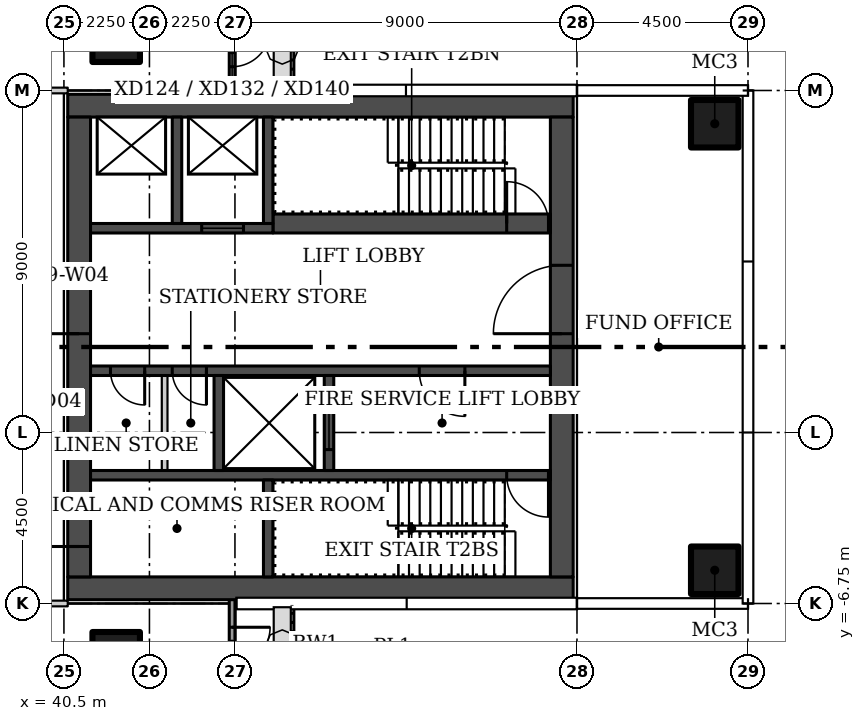
"""IFC4 building model, lengths in metres.
Left out: names, types, materials, properties, quantities, classifications, styles, units other than length and angle.
Written with IfcOpenShell. Run it as: python <this file> out.ifc"""

import sys

from ifc_helpers import new_model, si_unit, direction, frame, frame_2d, origin, origin_2d, place, context, subcontext, project, spatial, rectangle, hollow_rectangle, extrude, element, fill, save


model = new_model("IFC4")
c1 = context("Model", 3, precision=1e-05, world=origin(), true_north=direction((0.0, 1.0)))
c2 = subcontext(c1, "Body", "Model", "MODEL_VIEW")
j1 = project(units=[si_unit("LENGTHUNIT", "METRE"), si_unit("PLANEANGLEUNIT", "RADIAN")], contexts=[c1])
p1 = place(None, origin())
s1 = spatial("IfcSite", under=j1, at=p1, CompositionType="ELEMENT")
p2 = place(p1, origin())
s2 = spatial("IfcBuilding", under=s1, at=p2, CompositionType="ELEMENT")
p3 = place(p2, frame((0.0, 0.0, 89.7)))
s3 = spatial("IfcBuildingStorey", under=s2, at=p3, CompositionType="ELEMENT", Elevation=89.7)
for number, where in (
    (1, (41.875, 8.125, 0.0)),
    (2, (41.875, -8.125, 0.0)),
    (3, (57.625, -5.875, 0.0)),
    (4, (57.625, 5.875, 0.0)),
):
    element("IfcColumn", number, at=place(p3, frame(where)), inside=s3, PredefinedType="COLUMN", context=c2, shape_type="SweptSolid", body=[
        extrude(hollow_rectangle(XDim=1.25, YDim=1.25, WallThickness=0.05, at=origin_2d()), origin(), (0.0, 0.0, 1.0), 3.55),
    ])
p4 = place(p3, frame((26.9, 6.75, 0.0)))
e5 = element("IfcWall", 5, at=p4, inside=s3, PredefinedType="PARTITIONING", context=c2, shape_type="SweptSolid", body=[
    extrude(rectangle(XDim=13.7, YDim=0.15, at=frame_2d((6.85, 0.0))), origin(), (0.0, 0.0, 1.0), 3.55),
])
p5 = place(p4, frame((10.85, 0.0, 0.0)))
e6 = element("IfcOpeningElement", 6, at=p5, cuts=e5, PredefinedType="OPENING", context=c2, shape_type="SweptSolid", body=[
    extrude(rectangle(XDim=1.0, YDim=2.4, at=frame_2d((0.5, 1.2))), frame((0.0, 0.085, 0.0), z_axis=(0.0, -1.0, 0.0), x_axis=(1.0, 0.0, 0.0)), (0.0, 0.0, 1.0), 0.17),
])
p6 = place(p4, frame((3.85, 0.0, 0.0)))
e7 = element("IfcOpeningElement", 7, at=p6, cuts=e5, PredefinedType="OPENING", context=c2, shape_type="SweptSolid", body=[
    extrude(rectangle(XDim=1.5, YDim=2.1, at=frame_2d((0.75, 1.05))), frame((0.0, 0.085, 0.0), z_axis=(0.0, -1.0, 0.0), x_axis=(1.0, 0.0, 0.0)), (0.0, 0.0, 1.0), 0.17),
])
p7 = place(p3, frame((40.6, -6.75, 0.0), z_axis=(0.0, 0.0, 1.0), x_axis=(-1.0, 0.0, 0.0)))
e8 = element("IfcWall", 8, at=p7, inside=s3, PredefinedType="PARTITIONING", context=c2, shape_type="SweptSolid", body=[
    extrude(rectangle(XDim=13.7, YDim=0.15, at=frame_2d((6.85, 0.0))), origin(), (0.0, 0.0, 1.0), 3.55),
])
p8 = place(p7, frame((8.35, 0.0, 0.0)))
e9 = element("IfcOpeningElement", 9, at=p8, cuts=e8, PredefinedType="OPENING", context=c2, shape_type="SweptSolid", body=[
    extrude(rectangle(XDim=1.5, YDim=2.1, at=frame_2d((0.75, 1.05))), frame((0.0, 0.085, 0.0), z_axis=(0.0, -1.0, 0.0), x_axis=(1.0, 0.0, 0.0)), (0.0, 0.0, 1.0), 0.17),
])
p9 = place(p7, frame((1.6, 0.0, 0.0)))
e10 = element("IfcOpeningElement", 10, at=p9, cuts=e8, PredefinedType="OPENING", context=c2, shape_type="SweptSolid", body=[
    extrude(rectangle(XDim=1.5, YDim=2.1, at=frame_2d((0.75, 1.05))), frame((0.0, 0.085, 0.0), z_axis=(0.0, -1.0, 0.0), x_axis=(1.0, 0.0, 0.0)), (0.0, 0.0, 1.0), 0.17),
])
p10 = place(p3, frame((44.925, 9.0, 0.0), z_axis=(0.0, 0.0, 1.0), x_axis=(0.0, -1.0, 0.0)))
e11 = element("IfcWall", 11, at=p10, inside=s3, PredefinedType="SOLIDWALL", context=c2, shape_type="SweptSolid", body=[
    extrude(rectangle(XDim=2.357, YDim=0.15, at=frame_2d((1.178, 0.0))), origin(), (0.0, 0.0, 1.0), 3.45),
])
p11 = place(p10, frame((0.625, 0.0, 0.0)))
e12 = element("IfcOpeningElement", 12, at=p11, cuts=e11, PredefinedType="OPENING", context=c2, shape_type="SweptSolid", body=[
    extrude(rectangle(XDim=1.0, YDim=2.4, at=frame_2d((0.5, 1.2))), frame((0.0, 0.085, 0.0), z_axis=(0.0, -1.0, 0.0), x_axis=(1.0, 0.0, 0.0)), (0.0, 0.0, 1.0), 0.17),
])
p12 = place(p3, frame((44.925, -6.643, 0.0), z_axis=(0.0, 0.0, 1.0), x_axis=(0.0, -1.0, 0.0)))
e13 = element("IfcWall", 13, at=p12, inside=s3, PredefinedType="SOLIDWALL", context=c2, shape_type="SweptSolid", body=[
    extrude(rectangle(XDim=2.357, YDim=0.15, at=frame_2d((1.178, 0.0))), origin(), (0.0, 0.0, 1.0), 3.45),
])
p13 = place(p12, frame((0.732, 0.0, 0.0)))
e14 = element("IfcOpeningElement", 14, at=p13, cuts=e13, PredefinedType="OPENING", context=c2, shape_type="SweptSolid", body=[
    extrude(rectangle(XDim=1.0, YDim=2.4, at=frame_2d((0.5, 1.2))), frame((0.0, 0.085, 0.0), z_axis=(0.0, -1.0, 0.0), x_axis=(1.0, 0.0, 0.0)), (0.0, 0.0, 1.0), 0.17),
])
for number, where, z_axis, x_axis in (
    (15, (53.9, -6.35, 0.0), (0.0, 0.0, 1.0), (-1.0, 0.0, 0.0)),
    (16, (53.9, 6.35, 0.0), (0.0, 0.0, 1.0), (-1.0, 0.0, 0.0)),
):
    element("IfcWall", number, at=place(p3, frame(where, z_axis=z_axis, x_axis=x_axis)), inside=s3, PredefinedType="SHEAR", context=c2, shape_type="SweptSolid", body=[
        extrude(rectangle(XDim=13.3, YDim=0.6, at=frame_2d((6.65, 0.0))), origin(), (0.0, 0.0, 1.0), 3.55),
    ])
p14 = place(p3, frame((53.6, -6.05, 0.0), z_axis=(0.0, 0.0, 1.0), x_axis=(0.0, 1.0, 0.0)))
e17 = element("IfcWall", 17, at=p14, inside=s3, PredefinedType="SHEAR", context=c2, shape_type="SweptSolid", body=[
    extrude(rectangle(XDim=12.1, YDim=0.6, at=frame_2d((6.05, 0.0))), origin(), (0.0, 0.0, 1.0), 3.55),
])
p15 = place(p14, frame((6.4, 0.0, 0.0)))
e18 = element("IfcOpeningElement", 18, at=p15, cuts=e17, PredefinedType="OPENING", context=c2, shape_type="SweptSolid", body=[
    extrude(rectangle(XDim=1.8, YDim=2.4, at=frame_2d((0.9, 1.2))), frame((0.0, 0.31, 0.0), z_axis=(0.0, -1.0, 0.0), x_axis=(1.0, 0.0, 0.0)), (0.0, 0.0, 1.0), 0.62),
])
p16 = place(p3, frame((40.9, -6.05, 0.0), z_axis=(0.0, 0.0, 1.0), x_axis=(0.0, 1.0, 0.0)))
e19 = element("IfcWall", 19, at=p16, inside=s3, PredefinedType="SHEAR", context=c2, shape_type="SweptSolid", body=[
    extrude(rectangle(XDim=12.1, YDim=0.6, at=frame_2d((6.05, 0.0))), origin(), (0.0, 0.0, 1.0), 3.55),
])
p17 = place(p16, frame((0.8, 0.0, 0.0)))
e20 = element("IfcOpeningElement", 20, at=p17, cuts=e19, PredefinedType="OPENING", context=c2, shape_type="SweptSolid", body=[
    extrude(rectangle(XDim=1.2, YDim=2.1, at=frame_2d((0.6, 1.05))), frame((0.0, 0.31, 0.0), z_axis=(0.0, -1.0, 0.0), x_axis=(1.0, 0.0, 0.0)), (0.0, 0.0, 1.0), 0.62),
])
p18 = place(p16, frame((6.4, 0.0, 0.0)))
e21 = element("IfcOpeningElement", 21, at=p18, cuts=e19, PredefinedType="OPENING", context=c2, shape_type="SweptSolid", body=[
    extrude(rectangle(XDim=1.8, YDim=2.4, at=frame_2d((0.9, 1.2))), frame((0.0, 0.31, 0.0), z_axis=(0.0, -1.0, 0.0), x_axis=(1.0, 0.0, 0.0)), (0.0, 0.0, 1.0), 0.62),
])
p19 = place(p3, frame((53.3, -3.375, 0.0), z_axis=(0.0, 0.0, 1.0), x_axis=(-1.0, 0.0, 0.0)))
e22 = element("IfcWall", 22, at=p19, inside=s3, PredefinedType="SHEAR", context=c2, shape_type="SweptSolid", body=[
    extrude(rectangle(XDim=12.1, YDim=0.25, at=frame_2d((6.05, 0.0))), origin(), (0.0, 0.0, 1.0), 3.55),
])
p20 = place(p19, frame((0.05, 0.0, 0.0)))
e23 = element("IfcOpeningElement", 23, at=p20, cuts=e22, PredefinedType="OPENING", context=c2, shape_type="SweptSolid", body=[
    extrude(rectangle(XDim=1.1, YDim=2.1, at=frame_2d((0.55, 1.05))), frame((0.0, 0.135, 0.0), z_axis=(0.0, -1.0, 0.0), x_axis=(1.0, 0.0, 0.0)), (0.0, 0.0, 1.0), 0.27),
])
p21 = place(p3, frame((45.875, -6.05, 0.0), z_axis=(0.0, 0.0, 1.0), x_axis=(0.0, 1.0, 0.0)))
e24 = element("IfcWall", 24, at=p21, inside=s3, PredefinedType="SHEAR", context=c2, shape_type="SweptSolid", body=[
    extrude(rectangle(XDim=2.55, YDim=0.25, at=frame_2d((1.275, 0.0))), origin(), (0.0, 0.0, 1.0), 3.55),
])
p22 = place(p3, frame((53.3, -0.625, 0.0), z_axis=(0.0, 0.0, 1.0), x_axis=(-1.0, 0.0, 0.0)))
e25 = element("IfcWall", 25, at=p22, inside=s3, PredefinedType="SHEAR", context=c2, shape_type="SweptSolid", body=[
    extrude(rectangle(XDim=12.1, YDim=0.25, at=frame_2d((6.05, 0.0))), origin(), (0.0, 0.0, 1.0), 3.55),
])
p23 = place(p22, frame((2.25, 0.0, 0.0)))
e26 = element("IfcOpeningElement", 26, at=p23, cuts=e25, PredefinedType="OPENING", context=c2, shape_type="SweptSolid", body=[
    extrude(rectangle(XDim=1.2, YDim=2.1, at=frame_2d((0.6, 1.05))), frame((0.0, 0.135, 0.0), z_axis=(0.0, -1.0, 0.0), x_axis=(1.0, 0.0, 0.0)), (0.0, 0.0, 1.0), 0.27),
])
p24 = place(p22, frame((9.05, 0.0, 0.0)))
e27 = element("IfcOpeningElement", 27, at=p24, cuts=e25, PredefinedType="OPENING", context=c2, shape_type="SweptSolid", body=[
    extrude(rectangle(XDim=0.9, YDim=2.1, at=frame_2d((0.45, 1.05))), frame((0.0, 0.135, 0.0), z_axis=(0.0, -1.0, 0.0), x_axis=(1.0, 0.0, 0.0)), (0.0, 0.0, 1.0), 0.27),
])
p25 = place(p22, frame((10.675, 0.0, 0.0)))
e28 = element("IfcOpeningElement", 28, at=p25, cuts=e25, PredefinedType="OPENING", context=c2, shape_type="SweptSolid", body=[
    extrude(rectangle(XDim=0.9, YDim=2.1, at=frame_2d((0.45, 1.05))), frame((0.0, 0.135, 0.0), z_axis=(0.0, -1.0, 0.0), x_axis=(1.0, 0.0, 0.0)), (0.0, 0.0, 1.0), 0.27),
])
p26 = place(p3, frame((47.475, -3.25, 0.0), z_axis=(0.0, 0.0, 1.0), x_axis=(0.0, 1.0, 0.0)))
e29 = element("IfcWall", 29, at=p26, inside=s3, PredefinedType="SHEAR", context=c2, shape_type="SweptSolid", body=[
    extrude(rectangle(XDim=2.5, YDim=0.25, at=frame_2d((1.25, 0.0))), origin(), (0.0, 0.0, 1.0), 3.55),
])
p27 = place(p26, frame((0.55, 0.0, 0.0)))
e30 = element("IfcOpeningElement", 30, at=p27, cuts=e29, PredefinedType="OPENING", context=c2, shape_type="SweptSolid", body=[
    extrude(rectangle(XDim=1.4, YDim=2.4, at=frame_2d((0.7, 1.2))), frame((0.0, 0.135, 0.0), z_axis=(0.0, -1.0, 0.0), x_axis=(1.0, 0.0, 0.0)), (0.0, 0.0, 1.0), 0.27),
])
p28 = place(p3, frame((44.575, -3.25, 0.0), z_axis=(0.0, 0.0, 1.0), x_axis=(0.0, 1.0, 0.0)))
e31 = element("IfcWall", 31, at=p28, inside=s3, PredefinedType="SHEAR", context=c2, shape_type="SweptSolid", body=[
    extrude(rectangle(XDim=2.5, YDim=0.25, at=frame_2d((1.25, 0.0))), origin(), (0.0, 0.0, 1.0), 3.55),
])
p29 = place(p3, frame((43.15, -3.25, 0.0), z_axis=(0.0, 0.0, 1.0), x_axis=(0.0, 1.0, 0.0)))
e32 = element("IfcWall", 32, at=p29, inside=s3, PredefinedType="PARTITIONING", context=c2, shape_type="SweptSolid", body=[
    extrude(rectangle(XDim=2.5, YDim=0.15, at=frame_2d((1.25, 0.0))), origin(), (0.0, 0.0, 1.0), 3.55),
])
p30 = place(p3, frame((46.0, 3.25, 0.0)))
e33 = element("IfcWall", 33, at=p30, inside=s3, PredefinedType="SHEAR", context=c2, shape_type="SweptSolid", body=[
    extrude(rectangle(XDim=7.3, YDim=0.5, at=frame_2d((3.65, 0.0))), origin(), (0.0, 0.0, 1.0), 3.55),
])
p31 = place(p30, frame((6.15, 0.0, 0.0)))
e34 = element("IfcOpeningElement", 34, at=p31, cuts=e33, PredefinedType="OPENING", context=c2, shape_type="SweptSolid", body=[
    extrude(rectangle(XDim=1.1, YDim=2.1, at=frame_2d((0.55, 1.05))), frame((0.0, 0.26, 0.0), z_axis=(0.0, -1.0, 0.0), x_axis=(1.0, 0.0, 0.0)), (0.0, 0.0, 1.0), 0.52),
])
p32 = place(p3, frame((46.0, 3.125, 0.0), z_axis=(0.0, 0.0, 1.0), x_axis=(-1.0, 0.0, 0.0)))
e35 = element("IfcWall", 35, at=p32, inside=s3, PredefinedType="SHEAR", context=c2, shape_type="SweptSolid", body=[
    extrude(rectangle(XDim=4.8, YDim=0.25, at=frame_2d((2.4, 0.0))), origin(), (0.0, 0.0, 1.0), 3.55),
])
p33 = place(p32, frame((0.775, 0.0, 0.0)))
e36 = element("IfcOpeningElement", 36, at=p33, cuts=e35, PredefinedType="OPENING", context=c2, shape_type="SweptSolid", body=[
    extrude(rectangle(XDim=1.1, YDim=2.1, at=frame_2d((0.55, 1.05))), frame((0.0, 0.135, 0.0), z_axis=(0.0, -1.0, 0.0), x_axis=(1.0, 0.0, 0.0)), (0.0, 0.0, 1.0), 0.27),
])
for number, where, z_axis, x_axis in (
    (37, (45.875, 3.25, 0.0), (0.0, 0.0, 1.0), (0.0, 1.0, 0.0)),
    (38, (43.475, 3.25, 0.0), (0.0, 0.0, 1.0), (0.0, 1.0, 0.0)),
):
    element("IfcWall", number, at=place(p3, frame(where, z_axis=z_axis, x_axis=x_axis)), inside=s3, PredefinedType="SHEAR", context=c2, shape_type="SweptSolid", body=[
        extrude(rectangle(XDim=2.8, YDim=0.25, at=frame_2d((1.4, 0.0))), origin(), (0.0, 0.0, 1.0), 3.55),
    ])
p34 = place(p11, origin())
e39 = element("IfcDoor", 39, at=p34, inside=s3, OperationType="SINGLE_SWING_LEFT", PredefinedType="DOOR", context=c2, shape_type="SweptSolid", body=[
    extrude(rectangle(XDim=1.0, YDim=2.4, at=frame_2d((0.5, 1.2))), frame((0.0, 0.025, 0.0), z_axis=(0.0, -1.0, 0.0), x_axis=(1.0, 0.0, 0.0)), (0.0, 0.0, 1.0), 0.05),
])
fill(e12, e39)
p35 = place(p13, origin())
e40 = element("IfcDoor", 40, at=p35, inside=s3, OperationType="SINGLE_SWING_RIGHT", PredefinedType="DOOR", context=c2, shape_type="SweptSolid", body=[
    extrude(rectangle(XDim=1.0, YDim=2.4, at=frame_2d((0.5, 1.2))), frame((0.0, 0.025, 0.0), z_axis=(0.0, -1.0, 0.0), x_axis=(1.0, 0.0, 0.0)), (0.0, 0.0, 1.0), 0.05),
])
fill(e14, e40)
p36 = place(p15, origin())
e41 = element("IfcDoor", 41, at=p36, inside=s3, OperationType="DOUBLE_DOOR_SINGLE_SWING", PredefinedType="DOOR", context=c2, shape_type="SweptSolid", body=[
    extrude(rectangle(XDim=1.8, YDim=2.4, at=frame_2d((0.9, 1.2))), frame((0.0, 0.025, 0.0), z_axis=(0.0, -1.0, 0.0), x_axis=(1.0, 0.0, 0.0)), (0.0, 0.0, 1.0), 0.05),
])
fill(e18, e41)
p37 = place(p17, origin())
e42 = element("IfcDoor", 42, at=p37, inside=s3, OperationType="SINGLE_SWING_LEFT", PredefinedType="DOOR", context=c2, shape_type="SweptSolid", body=[
    extrude(rectangle(XDim=1.2, YDim=2.1, at=frame_2d((0.6, 1.05))), frame((0.0, 0.025, 0.0), z_axis=(0.0, -1.0, 0.0), x_axis=(1.0, 0.0, 0.0)), (0.0, 0.0, 1.0), 0.05),
])
fill(e20, e42)
p38 = place(p18, origin())
e43 = element("IfcDoor", 43, at=p38, inside=s3, OperationType="DOUBLE_DOOR_SINGLE_SWING", PredefinedType="DOOR", context=c2, shape_type="SweptSolid", body=[
    extrude(rectangle(XDim=1.8, YDim=2.4, at=frame_2d((0.9, 1.2))), frame((0.0, 0.025, 0.0), z_axis=(0.0, -1.0, 0.0), x_axis=(1.0, 0.0, 0.0)), (0.0, 0.0, 1.0), 0.05),
])
fill(e21, e43)
p39 = place(p20, origin())
e44 = element("IfcDoor", 44, at=p39, inside=s3, OperationType="SINGLE_SWING_LEFT", PredefinedType="DOOR", context=c2, shape_type="SweptSolid", body=[
    extrude(rectangle(XDim=1.1, YDim=2.1, at=frame_2d((0.55, 1.05))), frame((0.0, 0.025, 0.0), z_axis=(0.0, -1.0, 0.0), x_axis=(1.0, 0.0, 0.0)), (0.0, 0.0, 1.0), 0.05),
])
fill(e23, e44)
p40 = place(p23, origin())
e45 = element("IfcDoor", 45, at=p40, inside=s3, OperationType="SINGLE_SWING_LEFT", PredefinedType="DOOR", context=c2, shape_type="SweptSolid", body=[
    extrude(rectangle(XDim=1.2, YDim=2.1, at=frame_2d((0.6, 1.05))), frame((0.0, 0.025, 0.0), z_axis=(0.0, -1.0, 0.0), x_axis=(1.0, 0.0, 0.0)), (0.0, 0.0, 1.0), 0.05),
])
fill(e26, e45)
p41 = place(p24, origin())
e46 = element("IfcDoor", 46, at=p41, inside=s3, OperationType="SINGLE_SWING_RIGHT", PredefinedType="DOOR", context=c2, shape_type="SweptSolid", body=[
    extrude(rectangle(XDim=0.9, YDim=2.1, at=frame_2d((0.45, 1.05))), frame((0.0, 0.025, 0.0), z_axis=(0.0, -1.0, 0.0), x_axis=(1.0, 0.0, 0.0)), (0.0, 0.0, 1.0), 0.05),
])
fill(e27, e46)
p42 = place(p25, origin())
e47 = element("IfcDoor", 47, at=p42, inside=s3, OperationType="SINGLE_SWING_RIGHT", PredefinedType="DOOR", context=c2, shape_type="SweptSolid", body=[
    extrude(rectangle(XDim=0.9, YDim=2.1, at=frame_2d((0.45, 1.05))), frame((0.0, 0.025, 0.0), z_axis=(0.0, -1.0, 0.0), x_axis=(1.0, 0.0, 0.0)), (0.0, 0.0, 1.0), 0.05),
])
fill(e28, e47)
p43 = place(p27, origin())
e48 = element("IfcDoor", 48, at=p43, inside=s3, OperationType="SLIDING_TO_LEFT", PredefinedType="DOOR", context=c2, shape_type="SweptSolid", body=[
    extrude(rectangle(XDim=1.4, YDim=2.4, at=frame_2d((0.7, 1.2))), frame((0.0, 0.025, 0.0), z_axis=(0.0, -1.0, 0.0), x_axis=(1.0, 0.0, 0.0)), (0.0, 0.0, 1.0), 0.05),
])
fill(e30, e48)
p44 = place(p31, origin())
e49 = element("IfcDoor", 49, at=p44, inside=s3, OperationType="SINGLE_SWING_RIGHT", PredefinedType="DOOR", context=c2, shape_type="SweptSolid", body=[
    extrude(rectangle(XDim=1.1, YDim=2.1, at=frame_2d((0.55, 1.05))), frame((0.0, 0.025, 0.0), z_axis=(0.0, -1.0, 0.0), x_axis=(1.0, 0.0, 0.0)), (0.0, 0.0, 1.0), 0.05),
])
fill(e34, e49)
p45 = place(p33, origin())
e50 = element("IfcDoor", 50, at=p45, inside=s3, OperationType="SLIDING_TO_LEFT", PredefinedType="DOOR", context=c2, shape_type="SweptSolid", body=[
    extrude(rectangle(XDim=1.1, YDim=2.1, at=frame_2d((0.55, 1.05))), frame((0.0, 0.025, 0.0), z_axis=(0.0, -1.0, 0.0), x_axis=(1.0, 0.0, 0.0)), (0.0, 0.0, 1.0), 0.05),
])
fill(e36, e50)
save(model, sys.argv[1])
